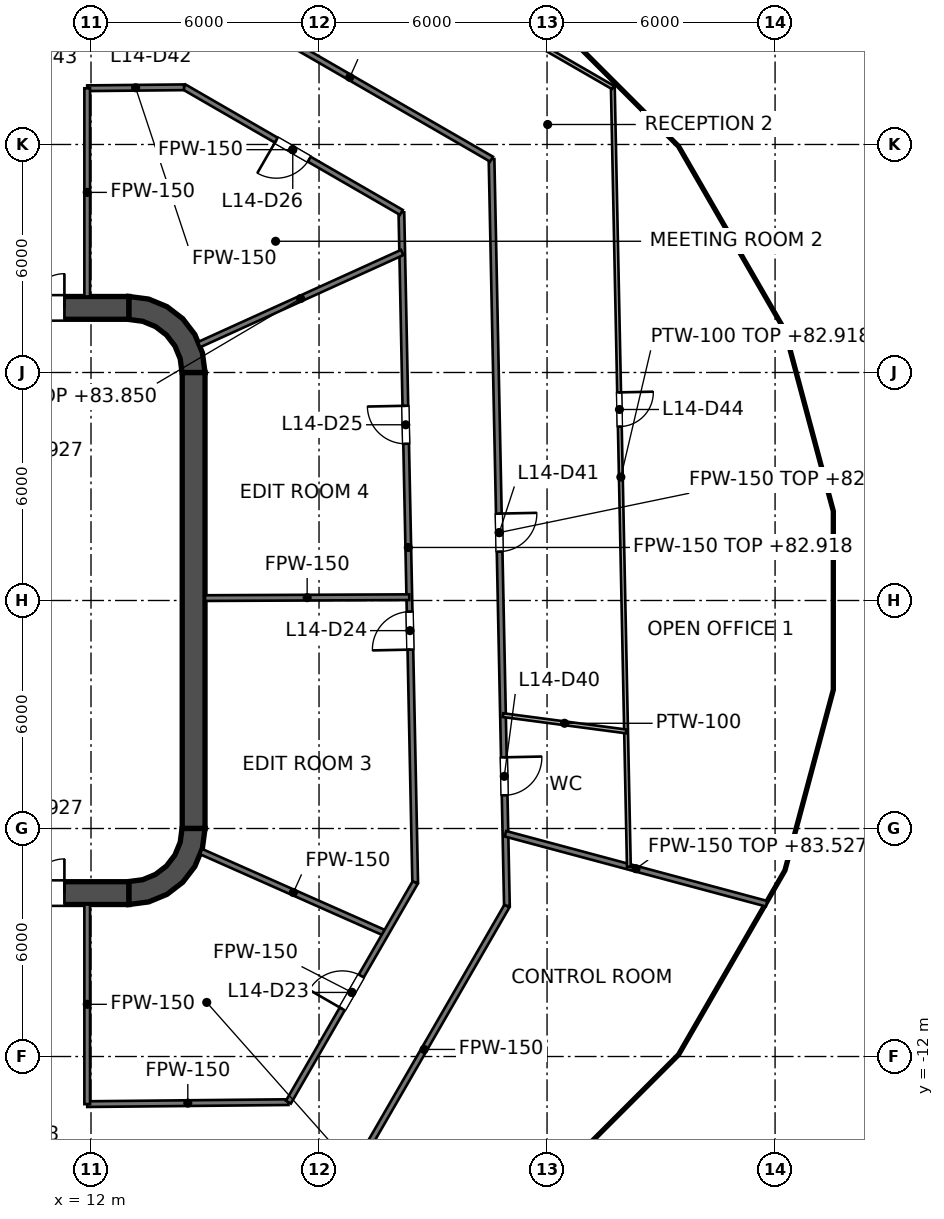
"""IFC4 building model, lengths in metres.
Left out: names, types, materials, properties, quantities, classifications, styles, units other than length and angle.
Written with IfcOpenShell. Run it as: python <this file> out.ifc"""

import sys

from ifc_helpers import new_model, si_unit, direction, frame, frame_2d, origin, place, context, subcontext, project, spatial, polyline, rectangle, outline, extrude, element, fill, save


model = new_model("IFC4")
c1 = context("Model", 3, precision=1e-05, world=origin(), true_north=direction((0.0, 1.0)))
c2 = subcontext(c1, "Body", "Model", "MODEL_VIEW")
j1 = project(units=[si_unit("LENGTHUNIT", "METRE"), si_unit("PLANEANGLEUNIT", "RADIAN")], contexts=[c1])
p1 = place(None, origin())
s1 = spatial("IfcSite", under=j1, at=p1, CompositionType="ELEMENT")
p2 = place(p1, origin())
s2 = spatial("IfcBuilding", under=s1, at=p2, CompositionType="ELEMENT")
p3 = place(p2, frame((0.0, 0.0, 79.8)))
s3 = spatial("IfcBuildingStorey", under=s2, at=p3, CompositionType="ELEMENT", Elevation=79.8)
p4 = place(p3, frame((-13.0, 7.7, 0.0), z_axis=(0.0, 0.0, 1.0), x_axis=(1.0, 0.0, 0.0)))
e1 = element("IfcWall", 1, at=p4, inside=s3, PredefinedType="SHEAR", context=c2, shape_type="SweptSolid", body=[
    extrude(rectangle(XDim=26.0, YDim=0.6, at=frame_2d((13.0, 0.0))), origin(), (0.0, 0.0, 1.0), 4.2),
])
p5 = place(p4, frame((1.7, 0.0, 0.0)))
e2 = element("IfcOpeningElement", 2, at=p5, cuts=e1, PredefinedType="OPENING", context=c2, shape_type="SweptSolid", body=[
    extrude(rectangle(XDim=1.8, YDim=2.1, at=frame_2d((0.9, 1.05))), frame((0.0, 0.3, 0.0), z_axis=(0.0, -1.0, 0.0), x_axis=(1.0, 0.0, 0.0)), (0.0, 0.0, 1.0), 0.6),
])
p6 = place(p4, frame((22.5, 0.0, 0.0)))
e3 = element("IfcOpeningElement", 3, at=p6, cuts=e1, PredefinedType="OPENING", context=c2, shape_type="SweptSolid", body=[
    extrude(rectangle(XDim=1.8, YDim=2.1, at=frame_2d((0.9, 1.05))), frame((0.0, 0.3, 0.0), z_axis=(0.0, -1.0, 0.0), x_axis=(1.0, 0.0, 0.0)), (0.0, 0.0, 1.0), 0.6),
])
p7 = place(p3, frame((-13.0, -7.7, 0.0), z_axis=(0.0, 0.0, 1.0), x_axis=(1.0, 0.0, 0.0)))
e4 = element("IfcWall", 4, at=p7, inside=s3, PredefinedType="SHEAR", context=c2, shape_type="SweptSolid", body=[
    extrude(rectangle(XDim=26.0, YDim=0.6, at=frame_2d((13.0, 0.0))), origin(), (0.0, 0.0, 1.0), 4.2),
])
p8 = place(p7, frame((1.7, 0.0, 0.0)))
e5 = element("IfcOpeningElement", 5, at=p8, cuts=e4, PredefinedType="OPENING", context=c2, shape_type="SweptSolid", body=[
    extrude(rectangle(XDim=1.8, YDim=2.1, at=frame_2d((0.9, 1.05))), frame((0.0, 0.3, 0.0), z_axis=(0.0, -1.0, 0.0), x_axis=(1.0, 0.0, 0.0)), (0.0, 0.0, 1.0), 0.6),
])
p9 = place(p7, frame((22.5, 0.0, 0.0)))
e6 = element("IfcOpeningElement", 6, at=p9, cuts=e4, PredefinedType="OPENING", context=c2, shape_type="SweptSolid", body=[
    extrude(rectangle(XDim=1.8, YDim=2.1, at=frame_2d((0.9, 1.05))), frame((0.0, 0.3, 0.0), z_axis=(0.0, -1.0, 0.0), x_axis=(1.0, 0.0, 0.0)), (0.0, 0.0, 1.0), 0.6),
])
p10 = place(p3, frame((14.7, -6.0, 0.0), z_axis=(0.0, 0.0, 1.0), x_axis=(0.0, 1.0, 0.0)))
e7 = element("IfcWall", 7, at=p10, inside=s3, PredefinedType="SHEAR", context=c2, shape_type="SweptSolid", body=[
    extrude(rectangle(XDim=12.0, YDim=0.6, at=frame_2d((6.0, 0.0))), origin(), (0.0, 0.0, 1.0), 4.2),
])
p11 = place(p3, origin())
e8 = element("IfcWall", 8, at=p11, inside=s3, PredefinedType="SHEAR", context=c2, shape_type="SweptSolid", body=[
    extrude(outline(polyline([(13.0, 8.0), (13.0, 7.395), (13.361, 7.347), (13.698, 7.208), (13.986, 6.986), (14.208, 6.698), (14.347, 6.361), (14.395, 6.0), (15.0, 6.0), (14.932, 6.518), (14.732, 7.0), (14.414, 7.414), (14.0, 7.732), (13.518, 7.932), (13.0, 8.0)])), origin(), (0.0, 0.0, 1.0), 4.2),
])
e9 = element("IfcWall", 9, at=p11, inside=s3, PredefinedType="SHEAR", context=c2, shape_type="SweptSolid", body=[
    extrude(outline(polyline([(15.0, -6.0), (14.395, -6.0), (14.347, -6.361), (14.208, -6.698), (13.986, -6.986), (13.698, -7.208), (13.361, -7.347), (13.0, -7.395), (13.0, -8.0), (13.518, -7.932), (14.0, -7.732), (14.414, -7.414), (14.732, -7.0), (14.932, -6.518), (15.0, -6.0)])), origin(), (0.0, 0.0, 1.0), 4.2),
])
p12 = place(p3, frame((11.8, -7.4, 0.0), z_axis=(0.0, 0.0, 1.0), x_axis=(0.0, 1.0, 0.0)))
e10 = element("IfcWall", 10, at=p12, inside=s3, PredefinedType="SOLIDWALL", context=c2, shape_type="SweptSolid", body=[
    extrude(rectangle(XDim=14.8, YDim=0.4, at=frame_2d((7.4, 0.0))), origin(), (0.0, 0.0, 1.0), 4.05),
])
p13 = place(p12, frame((11.2, 0.0, 0.0)))
e11 = element("IfcOpeningElement", 11, at=p13, cuts=e10, PredefinedType="OPENING", context=c2, shape_type="SweptSolid", body=[
    extrude(rectangle(XDim=1.1, YDim=2.1, at=frame_2d((0.55, 1.05))), frame((0.0, 0.2, 0.0), z_axis=(0.0, -1.0, 0.0), x_axis=(1.0, 0.0, 0.0)), (0.0, 0.0, 1.0), 0.4),
])
p14 = place(p12, frame((8.3, 0.0, 0.0)))
e12 = element("IfcOpeningElement", 12, at=p14, cuts=e10, PredefinedType="OPENING", context=c2, shape_type="SweptSolid", body=[
    extrude(rectangle(XDim=1.1, YDim=2.1, at=frame_2d((0.55, 1.05))), frame((0.0, 0.2, 0.0), z_axis=(0.0, -1.0, 0.0), x_axis=(1.0, 0.0, 0.0)), (0.0, 0.0, 1.0), 0.4),
])
p15 = place(p12, frame((5.4, 0.0, 0.0)))
e13 = element("IfcOpeningElement", 13, at=p15, cuts=e10, PredefinedType="OPENING", context=c2, shape_type="SweptSolid", body=[
    extrude(rectangle(XDim=1.1, YDim=2.1, at=frame_2d((0.55, 1.05))), frame((0.0, 0.2, 0.0), z_axis=(0.0, -1.0, 0.0), x_axis=(1.0, 0.0, 0.0)), (0.0, 0.0, 1.0), 0.4),
])
p16 = place(p12, frame((13.552, 0.0, 0.0)))
e14 = element("IfcOpeningElement", 14, at=p16, cuts=e10, PredefinedType="OPENING", context=c2, shape_type="SweptSolid", body=[
    extrude(rectangle(XDim=0.9, YDim=2.1, at=frame_2d((0.45, 1.05))), frame((0.0, 0.2, 0.0), z_axis=(0.0, -1.0, 0.0), x_axis=(1.0, 0.0, 0.0)), (0.0, 0.0, 1.0), 0.4),
])
p17 = place(p12, frame((0.347, 0.0, 0.0)))
e15 = element("IfcOpeningElement", 15, at=p17, cuts=e10, PredefinedType="OPENING", context=c2, shape_type="SweptSolid", body=[
    extrude(rectangle(XDim=0.9, YDim=2.1, at=frame_2d((0.45, 1.05))), frame((0.0, 0.2, 0.0), z_axis=(0.0, -1.0, 0.0), x_axis=(1.0, 0.0, 0.0)), (0.0, 0.0, 1.0), 0.4),
])
e16 = element("IfcWall", 16, at=p11, inside=s3, PredefinedType="SOLIDWALL", context=c2, shape_type="SweptSolid", body=[
    extrude(outline(polyline([(12.0, -5.675), (12.0, -5.925), (14.15, -5.925), (14.4, -5.925), (14.4, -5.675), (14.4, -3.025), (14.4, -2.775), (14.4, -0.125), (14.4, 0.125), (14.4, 2.775), (14.4, 3.025), (14.4, 5.675), (14.4, 5.925), (14.15, 5.925), (12.0, 5.925), (12.0, 5.675), (14.15, 5.675), (14.15, 3.025), (12.0, 3.025), (12.0, 2.775), (14.15, 2.775), (14.15, 0.125), (12.0, 0.125), (12.0, -0.125), (14.15, -0.125), (14.15, -2.775), (12.0, -2.775), (12.0, -3.025), (14.15, -3.025), (14.15, -5.675), (12.0, -5.675)])), origin(), (0.0, 0.0, 1.0), 4.05),
])
p18 = place(p3, frame((20.167, 10.213, 0.0), z_axis=(0.0, 0.0, 1.0), x_axis=(0.020597058382, -0.999787858091, 0.0)))
e17 = element("IfcWall", 17, at=p18, inside=s3, PredefinedType="PARTITIONING", context=c2, shape_type="SweptSolid", body=[
    extrude(rectangle(XDim=17.637, YDim=0.15, at=frame_2d((8.819, 0.0))), origin(), (0.0, 0.0, 1.0), 3.118),
])
p19 = place(p18, frame((10.508, 0.0, 0.0)))
e18 = element("IfcOpeningElement", 18, at=p19, cuts=e17, PredefinedType="OPENING", context=c2, shape_type="SweptSolid", body=[
    extrude(rectangle(XDim=1.0, YDim=2.1, at=frame_2d((0.5, 1.05))), frame((0.0, 0.075, 0.0), z_axis=(0.0, -1.0, 0.0), x_axis=(1.0, 0.0, 0.0)), (0.0, 0.0, 1.0), 0.15),
])
p20 = place(p18, frame((5.09, 0.0, 0.0)))
e19 = element("IfcOpeningElement", 19, at=p20, cuts=e17, PredefinedType="OPENING", context=c2, shape_type="SweptSolid", body=[
    extrude(rectangle(XDim=1.0, YDim=2.1, at=frame_2d((0.5, 1.05))), frame((0.0, 0.075, 0.0), z_axis=(0.0, -1.0, 0.0), x_axis=(1.0, 0.0, 0.0)), (0.0, 0.0, 1.0), 0.15),
])
p21 = place(p3, frame((22.539, 11.615, 0.0), z_axis=(0.0, 0.0, 1.0), x_axis=(0.020589093921, -0.999788022138, 0.0)))
e20 = element("IfcWall", 20, at=p21, inside=s3, PredefinedType="PARTITIONING", context=c2, shape_type="SweptSolid", body=[
    extrude(rectangle(XDim=19.66, YDim=0.15, at=frame_2d((9.83, 0.0))), origin(), (0.0, 0.0, 1.0), 3.118),
])
p22 = place(p21, frame((15.745, 0.0, 0.0)))
e21 = element("IfcOpeningElement", 21, at=p22, cuts=e20, PredefinedType="OPENING", context=c2, shape_type="SweptSolid", body=[
    extrude(rectangle(XDim=1.0, YDim=2.1, at=frame_2d((0.5, 1.05))), frame((0.0, 0.075, 0.0), z_axis=(0.0, -1.0, 0.0), x_axis=(1.0, 0.0, 0.0)), (0.0, 0.0, 1.0), 0.15),
])
p23 = place(p21, frame((9.331, 0.0, 0.0)))
e22 = element("IfcOpeningElement", 22, at=p23, cuts=e20, PredefinedType="OPENING", context=c2, shape_type="SweptSolid", body=[
    extrude(rectangle(XDim=1.0, YDim=2.1, at=frame_2d((0.5, 1.05))), frame((0.0, 0.075, 0.0), z_axis=(0.0, -1.0, 0.0), x_axis=(1.0, 0.0, 0.0)), (0.0, 0.0, 1.0), 0.15),
])
p24 = place(p3, frame((14.448, 13.515, 0.0), z_axis=(0.0, 0.0, 1.0), x_axis=(0.865975016585, -0.500087263036, 0.0)))
e23 = element("IfcWall", 23, at=p24, inside=s3, PredefinedType="PARTITIONING", context=c2, shape_type="SweptSolid", body=[
    extrude(rectangle(XDim=6.604, YDim=0.15, at=frame_2d((3.302, 0.0))), origin(), (0.0, 0.0, 1.0), 3.195),
])
p25 = place(p24, frame((2.803, 0.0, 0.0)))
e24 = element("IfcOpeningElement", 24, at=p25, cuts=e23, PredefinedType="OPENING", context=c2, shape_type="SweptSolid", body=[
    extrude(rectangle(XDim=1.0, YDim=2.1, at=frame_2d((0.5, 1.05))), frame((0.0, 0.075, 0.0), z_axis=(0.0, -1.0, 0.0), x_axis=(1.0, 0.0, 0.0)), (0.0, 0.0, 1.0), 0.15),
])
p26 = place(p3, frame((15.08, 15.921, 0.0), z_axis=(0.0, 0.0, 1.0), x_axis=(0.865982112089, -0.50007497592, 0.0)))
e25 = element("IfcWall", 25, at=p26, inside=s3, PredefinedType="PARTITIONING", context=c2, shape_type="SweptSolid", body=[
    extrude(rectangle(XDim=8.613, YDim=0.15, at=frame_2d((4.306, 0.0))), origin(), (0.0, 0.0, 1.0), 3.195),
])
p27 = place(p3, frame((14.895, -6.607, 0.0), z_axis=(0.0, 0.0, 1.0), x_axis=(0.914233271379, -0.405188259337, 0.0)))
e26 = element("IfcWall", 26, at=p27, inside=s3, PredefinedType="PARTITIONING", context=c2, shape_type="SweptSolid", body=[
    extrude(rectangle(XDim=5.317, YDim=0.15, at=frame_2d((2.659, 0.0))), origin(), (0.0, 0.0, 1.0), 3.195),
])
p28 = place(p3, frame((22.905, -6.138, 0.0), z_axis=(0.0, 0.0, 1.0), x_axis=(0.965925533901, -0.258820136309, 0.0)))
e27 = element("IfcWall", 27, at=p28, inside=s3, PredefinedType="PARTITIONING", context=c2, shape_type="SweptSolid", body=[
    extrude(rectangle(XDim=7.114, YDim=0.15, at=frame_2d((3.557, 0.0))), origin(), (0.0, 0.0, 1.0), 3.727),
])
p29 = place(p3, frame((15.0, 0.063, 0.0), z_axis=(0.0, 0.0, 1.0), x_axis=(0.999990294223, 0.004405843865, 0.0)))
e28 = element("IfcWall", 28, at=p29, inside=s3, PredefinedType="PARTITIONING", context=c2, shape_type="SweptSolid", body=[
    extrude(rectangle(XDim=5.375, YDim=0.15, at=frame_2d((2.688, 0.0))), origin(), (0.0, 0.0, 1.0), 3.195),
])
p30 = place(p3, frame((11.9, -13.253, 0.0), z_axis=(0.0, 0.0, 1.0), x_axis=(0.999951309192, 0.009868092237, 0.0)))
e29 = element("IfcWall", 29, at=p30, inside=s3, PredefinedType="PARTITIONING", context=c2, shape_type="SweptSolid", body=[
    extrude(rectangle(XDim=5.294, YDim=0.15, at=frame_2d((2.647, 0.0))), origin(), (0.0, 0.0, 1.0), 3.195),
])
p31 = place(p3, frame((11.9, 13.48, 0.0), z_axis=(0.0, 0.0, 1.0), x_axis=(0.999951307579, 0.009868255694, 0.0)))
e30 = element("IfcWall", 30, at=p31, inside=s3, PredefinedType="PARTITIONING", context=c2, shape_type="SweptSolid", body=[
    extrude(rectangle(XDim=2.548, YDim=0.15, at=frame_2d((1.274, 0.0))), origin(), (0.0, 0.0, 1.0), 3.195),
])
p32 = place(p3, frame((14.843, 6.733, 0.0), z_axis=(0.0, 0.0, 1.0), x_axis=(0.910628361306, 0.413226315214, 0.0)))
e31 = element("IfcWall", 31, at=p32, inside=s3, PredefinedType="PARTITIONING", context=c2, shape_type="SweptSolid", body=[
    extrude(rectangle(XDim=5.87, YDim=0.15, at=frame_2d((2.935, 0.0))), origin(), (0.0, 0.0, 1.0), 4.05),
])
p33 = place(p3, frame((18.587, -15.587, 0.0), z_axis=(0.0, 0.0, 1.0), x_axis=(0.499993286632, 0.866029279715, 0.0)))
e32 = element("IfcWall", 32, at=p33, inside=s3, PredefinedType="PARTITIONING", context=c2, shape_type="SweptSolid", body=[
    extrude(rectangle(XDim=8.713, YDim=0.15, at=frame_2d((4.357, 0.0))), origin(), (0.0, 0.0, 1.0), 3.195),
])
p34 = place(p3, frame((17.194, -13.201, 0.0), z_axis=(0.0, 0.0, 1.0), x_axis=(0.499983182885, 0.866035112932, 0.0)))
e33 = element("IfcWall", 33, at=p34, inside=s3, PredefinedType="PARTITIONING", context=c2, shape_type="SweptSolid", body=[
    extrude(rectangle(XDim=6.674, YDim=0.15, at=frame_2d((3.337, 0.0))), origin(), (0.0, 0.0, 1.0), 3.195),
])
p35 = place(p34, frame((2.834, 0.0, 0.0)))
e34 = element("IfcOpeningElement", 34, at=p35, cuts=e33, PredefinedType="OPENING", context=c2, shape_type="SweptSolid", body=[
    extrude(rectangle(XDim=1.0, YDim=2.1, at=frame_2d((0.5, 1.05))), frame((0.0, 0.075, 0.0), z_axis=(0.0, -1.0, 0.0), x_axis=(1.0, 0.0, 0.0)), (0.0, 0.0, 1.0), 0.15),
])
p36 = place(p3, frame((11.9, -13.253, 0.0), z_axis=(0.0, 0.0, 1.0), x_axis=(0.0, 1.0, 0.0)))
e35 = element("IfcWall", 35, at=p36, inside=s3, PredefinedType="PARTITIONING", context=c2, shape_type="SweptSolid", body=[
    extrude(rectangle(XDim=5.253, YDim=0.15, at=frame_2d((2.626, 0.0))), origin(), (0.0, 0.0, 1.0), 3.195),
])
p37 = place(p3, frame((11.9, 8.0, 0.0), z_axis=(0.0, 0.0, 1.0), x_axis=(0.0, 1.0, 0.0)))
e36 = element("IfcWall", 36, at=p37, inside=s3, PredefinedType="PARTITIONING", context=c2, shape_type="SweptSolid", body=[
    extrude(rectangle(XDim=5.479, YDim=0.15, at=frame_2d((2.74, 0.0))), origin(), (0.0, 0.0, 1.0), 3.195),
])
p38 = place(p3, frame((25.731, 13.502, 0.0), z_axis=(0.0, 0.0, 1.0), x_axis=(0.020564874759, -0.999788520601, 0.0)))
e37 = element("IfcWall", 37, at=p38, inside=s3, PredefinedType="PARTITIONING", context=c2, shape_type="SweptSolid", body=[
    extrude(rectangle(XDim=20.514, YDim=0.1, at=frame_2d((10.257, 0.0))), origin(), (0.0, 0.0, 1.0), 3.118),
])
p39 = place(p38, frame((8.027, 0.0, 0.0)))
e38 = element("IfcOpeningElement", 38, at=p39, cuts=e37, PredefinedType="OPENING", context=c2, shape_type="SweptSolid", body=[
    extrude(rectangle(XDim=0.9, YDim=2.1, at=frame_2d((0.45, 1.05))), frame((0.0, 0.05, 0.0), z_axis=(0.0, -1.0, 0.0), x_axis=(1.0, 0.0, 0.0)), (0.0, 0.0, 1.0), 0.1),
])
p40 = place(p3, frame((15.931, 19.16, 0.0), z_axis=(0.0, 0.0, 1.0), x_axis=(0.866053377516, -0.499951544945, 0.0)))
e39 = element("IfcWall", 39, at=p40, inside=s3, PredefinedType="PARTITIONING", context=c2, shape_type="SweptSolid", body=[
    extrude(rectangle(XDim=11.316, YDim=0.1, at=frame_2d((5.658, 0.0))), origin(), (0.0, 0.0, 1.0), 3.195),
])
p41 = place(p3, frame((22.841, -3.017, 0.0), z_axis=(0.0, 0.0, 1.0), x_axis=(0.991388314311, -0.130954993217, 0.0)))
e40 = element("IfcWall", 40, at=p41, inside=s3, PredefinedType="PARTITIONING", context=c2, shape_type="SweptSolid", body=[
    extrude(rectangle(XDim=3.268, YDim=0.1, at=frame_2d((1.634, 0.0))), origin(), (0.0, 0.0, 1.0), 4.05),
])
p42 = place(p13, origin())
e41 = element("IfcDoor", 41, at=p42, inside=s3, OperationType="DOUBLE_DOOR_SLIDING", PredefinedType="DOOR", context=c2, shape_type="SweptSolid", body=[
    extrude(rectangle(XDim=1.1, YDim=2.1, at=frame_2d((0.55, 1.05))), frame((0.0, 0.025, 0.0), z_axis=(0.0, -1.0, 0.0), x_axis=(1.0, 0.0, 0.0)), (0.0, 0.0, 1.0), 0.05),
])
fill(e11, e41)
p43 = place(p14, origin())
e42 = element("IfcDoor", 42, at=p43, inside=s3, OperationType="DOUBLE_DOOR_SLIDING", PredefinedType="DOOR", context=c2, shape_type="SweptSolid", body=[
    extrude(rectangle(XDim=1.1, YDim=2.1, at=frame_2d((0.55, 1.05))), frame((0.0, 0.025, 0.0), z_axis=(0.0, -1.0, 0.0), x_axis=(1.0, 0.0, 0.0)), (0.0, 0.0, 1.0), 0.05),
])
fill(e12, e42)
p44 = place(p15, origin())
e43 = element("IfcDoor", 43, at=p44, inside=s3, OperationType="DOUBLE_DOOR_SLIDING", PredefinedType="DOOR", context=c2, shape_type="SweptSolid", body=[
    extrude(rectangle(XDim=1.1, YDim=2.1, at=frame_2d((0.55, 1.05))), frame((0.0, 0.025, 0.0), z_axis=(0.0, -1.0, 0.0), x_axis=(1.0, 0.0, 0.0)), (0.0, 0.0, 1.0), 0.05),
])
fill(e13, e43)
p45 = place(p16, origin())
e44 = element("IfcDoor", 44, at=p45, inside=s3, OperationType="SINGLE_SWING_RIGHT", PredefinedType="DOOR", context=c2, shape_type="SweptSolid", body=[
    extrude(rectangle(XDim=0.9, YDim=2.1, at=frame_2d((0.45, 1.05))), frame((0.0, 0.025, 0.0), z_axis=(0.0, -1.0, 0.0), x_axis=(1.0, 0.0, 0.0)), (0.0, 0.0, 1.0), 0.05),
])
fill(e14, e44)
p46 = place(p17, origin())
e45 = element("IfcDoor", 45, at=p46, inside=s3, OperationType="SINGLE_SWING_RIGHT", PredefinedType="DOOR", context=c2, shape_type="SweptSolid", body=[
    extrude(rectangle(XDim=0.9, YDim=2.1, at=frame_2d((0.45, 1.05))), frame((0.0, 0.025, 0.0), z_axis=(0.0, -1.0, 0.0), x_axis=(1.0, 0.0, 0.0)), (0.0, 0.0, 1.0), 0.05),
])
fill(e15, e45)
p47 = place(p6, origin())
e46 = element("IfcDoor", 46, at=p47, inside=s3, OperationType="DOUBLE_DOOR_SINGLE_SWING", PredefinedType="DOOR", context=c2, shape_type="SweptSolid", body=[
    extrude(rectangle(XDim=1.8, YDim=2.1, at=frame_2d((0.9, 1.05))), frame((0.0, 0.025, 0.0), z_axis=(0.0, -1.0, 0.0), x_axis=(1.0, 0.0, 0.0)), (0.0, 0.0, 1.0), 0.05),
])
fill(e3, e46)
p48 = place(p9, origin())
e47 = element("IfcDoor", 47, at=p48, inside=s3, OperationType="DOUBLE_DOOR_SINGLE_SWING", PredefinedType="DOOR", context=c2, shape_type="SweptSolid", body=[
    extrude(rectangle(XDim=1.8, YDim=2.1, at=frame_2d((0.9, 1.05))), frame((0.0, 0.025, 0.0), z_axis=(0.0, -1.0, 0.0), x_axis=(1.0, 0.0, 0.0)), (0.0, 0.0, 1.0), 0.05),
])
fill(e6, e47)
p49 = place(p35, origin())
e48 = element("IfcDoor", 48, at=p49, inside=s3, OperationType="SINGLE_SWING_LEFT", PredefinedType="DOOR", context=c2, shape_type="SweptSolid", body=[
    extrude(rectangle(XDim=1.0, YDim=2.1, at=frame_2d((0.5, 1.05))), frame((0.0, 0.025, 0.0), z_axis=(0.0, -1.0, 0.0), x_axis=(1.0, 0.0, 0.0)), (0.0, 0.0, 1.0), 0.05),
])
fill(e34, e48)
p50 = place(p19, origin())
e49 = element("IfcDoor", 49, at=p50, inside=s3, OperationType="SINGLE_SWING_RIGHT", PredefinedType="DOOR", context=c2, shape_type="SweptSolid", body=[
    extrude(rectangle(XDim=1.0, YDim=2.1, at=frame_2d((0.5, 1.05))), frame((0.0, 0.025, 0.0), z_axis=(0.0, -1.0, 0.0), x_axis=(1.0, 0.0, 0.0)), (0.0, 0.0, 1.0), 0.05),
])
fill(e18, e49)
p51 = place(p20, origin())
e50 = element("IfcDoor", 50, at=p51, inside=s3, OperationType="SINGLE_SWING_LEFT", PredefinedType="DOOR", context=c2, shape_type="SweptSolid", body=[
    extrude(rectangle(XDim=1.0, YDim=2.1, at=frame_2d((0.5, 1.05))), frame((0.0, 0.025, 0.0), z_axis=(0.0, -1.0, 0.0), x_axis=(1.0, 0.0, 0.0)), (0.0, 0.0, 1.0), 0.05),
])
fill(e19, e50)
p52 = place(p25, origin())
e51 = element("IfcDoor", 51, at=p52, inside=s3, OperationType="SINGLE_SWING_LEFT", PredefinedType="DOOR", context=c2, shape_type="SweptSolid", body=[
    extrude(rectangle(XDim=1.0, YDim=2.1, at=frame_2d((0.5, 1.05))), frame((0.0, 0.025, 0.0), z_axis=(0.0, -1.0, 0.0), x_axis=(1.0, 0.0, 0.0)), (0.0, 0.0, 1.0), 0.05),
])
fill(e24, e51)
p53 = place(p22, origin())
e52 = element("IfcDoor", 52, at=p53, inside=s3, OperationType="SINGLE_SWING_LEFT", PredefinedType="DOOR", context=c2, shape_type="SweptSolid", body=[
    extrude(rectangle(XDim=1.0, YDim=2.1, at=frame_2d((0.5, 1.05))), frame((0.0, 0.025, 0.0), z_axis=(0.0, -1.0, 0.0), x_axis=(1.0, 0.0, 0.0)), (0.0, 0.0, 1.0), 0.05),
])
fill(e21, e52)
p54 = place(p23, origin())
e53 = element("IfcDoor", 53, at=p54, inside=s3, OperationType="SINGLE_SWING_LEFT", PredefinedType="DOOR", context=c2, shape_type="SweptSolid", body=[
    extrude(rectangle(XDim=1.0, YDim=2.1, at=frame_2d((0.5, 1.05))), frame((0.0, 0.025, 0.0), z_axis=(0.0, -1.0, 0.0), x_axis=(1.0, 0.0, 0.0)), (0.0, 0.0, 1.0), 0.05),
])
fill(e22, e53)
p55 = place(p39, origin())
e54 = element("IfcDoor", 54, at=p55, inside=s3, OperationType="SINGLE_SWING_LEFT", PredefinedType="DOOR", context=c2, shape_type="SweptSolid", body=[
    extrude(rectangle(XDim=0.9, YDim=2.1, at=frame_2d((0.45, 1.05))), frame((0.0, 0.025, 0.0), z_axis=(0.0, -1.0, 0.0), x_axis=(1.0, 0.0, 0.0)), (0.0, 0.0, 1.0), 0.05),
])
fill(e38, e54)
save(model, sys.argv[1])
